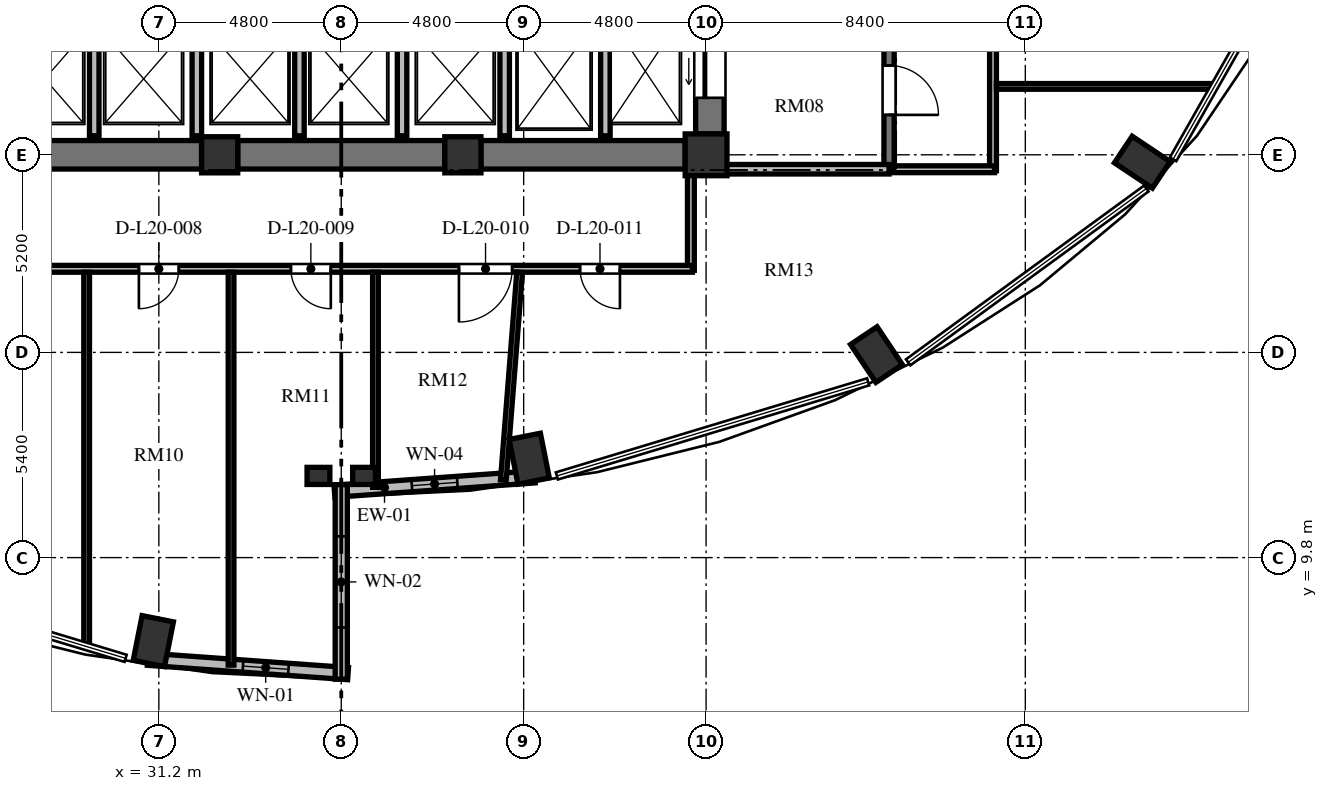
"""IFC4 building model, lengths in metres.
Left out: names, types, materials, properties, quantities, classifications, styles, units other than length and angle.
Written with IfcOpenShell. Run it as: python <this file> out.ifc"""

import sys

from ifc_helpers import new_model, si_unit, direction, frame, frame_2d, origin, origin_2d, place, context, subcontext, project, spatial, rectangle, extrude, element, fill, save


model = new_model("IFC4")
c1 = context("Model", 3, precision=1e-05, world=origin(), true_north=direction((0.0, 1.0)))
c2 = subcontext(c1, "Body", "Model", "MODEL_VIEW")
j1 = project(units=[si_unit("LENGTHUNIT", "METRE"), si_unit("PLANEANGLEUNIT", "RADIAN")], contexts=[c1])
p1 = place(None, origin())
s1 = spatial("IfcSite", under=j1, at=p1, CompositionType="ELEMENT")
p2 = place(p1, origin())
s2 = spatial("IfcBuilding", under=s1, at=p2, CompositionType="ELEMENT")
p3 = place(p2, frame((0.0, 0.0, 81.744)))
s3 = spatial("IfcBuildingStorey", under=s2, at=p3, CompositionType="ELEMENT", Elevation=81.744)
for number, where, z_axis, x_axis in (
    (1, (40.946, 12.403, 0.0), (0.0, 0.0, 1.0), (0.195, -0.981, 0.0)),
    (2, (50.084, 15.143, 0.0), (0.0, 0.0, 1.0), (0.556, -0.831, 0.0)),
    (3, (57.078, 20.205, 0.0), (0.0, 0.0, 1.0), (0.831, -0.556, 0.0)),
    (4, (31.054, 7.603, 0.0), (0.0, 0.0, 1.0), (-0.195, -0.981, 0.0)),
):
    element("IfcColumn", number, at=place(p3, frame(where, z_axis=z_axis, x_axis=x_axis)), inside=s3, PredefinedType="COLUMN", context=c2, shape_type="SweptSolid", body=[
        extrude(rectangle(XDim=1.2, YDim=0.84, at=origin_2d()), origin(), (0.0, 0.0, 1.0), 3.648),
    ])
for number, where, z_axis, x_axis in (
    (5, (32.8, 20.4, 0.0), (0.0, 0.0, 1.0), (1.0, 0.0, 0.0)),
    (6, (39.2, 20.4, 0.0), (0.0, 0.0, 1.0), (1.0, 0.0, 0.0)),
):
    element("IfcColumn", number, at=place(p3, frame(where, z_axis=z_axis, x_axis=x_axis)), inside=s3, PredefinedType="COLUMN", context=c2, shape_type="SweptSolid", body=[
        extrude(rectangle(XDim=0.95, YDim=0.95, at=origin_2d()), origin(), (0.0, 0.0, 1.0), 3.648),
    ])
p4 = place(p3, frame((45.6, 20.4, 0.0), z_axis=(0.0, 0.0, 1.0), x_axis=(1.0, 0.0, 0.0)))
e7 = element("IfcColumn", 7, at=p4, inside=s3, PredefinedType="COLUMN", context=c2, shape_type="SweptSolid", body=[
    extrude(rectangle(XDim=1.1, YDim=1.1, at=origin_2d()), origin(), (0.0, 0.0, 1.0), 3.648),
])
for number, where, z_axis, x_axis in (
    (8, (35.4, 11.95, 0.0), (0.0, 0.0, 1.0), (1.0, 0.0, 0.0)),
    (9, (36.6, 11.95, 0.0), (0.0, 0.0, 1.0), (1.0, 0.0, 0.0)),
):
    element("IfcColumn", number, at=place(p3, frame(where, z_axis=z_axis, x_axis=x_axis)), inside=s3, PredefinedType="PILASTER", context=c2, shape_type="SweptSolid", body=[
        extrude(rectangle(XDim=0.6, YDim=0.45, at=origin_2d()), origin(), (0.0, 0.0, 1.0), 3.648),
    ])
p5 = place(p3, frame((45.7, 20.95, 0.0), z_axis=(0.0, 0.0, 1.0), x_axis=(0.0, 1.0, 0.0)))
e10 = element("IfcWall", 10, at=p5, inside=s3, PredefinedType="SHEAR", context=c2, shape_type="SweptSolid", body=[
    extrude(rectangle(XDim=14.1, YDim=0.75, at=frame_2d((7.05, 0.0))), origin(), (0.0, 0.0, 1.0), 3.648),
])
p6 = place(p5, frame((11.75, 0.0, 0.0)))
e11 = element("IfcOpeningElement", 11, at=p6, cuts=e10, PredefinedType="OPENING", context=c2, shape_type="SweptSolid", body=[
    extrude(rectangle(XDim=1.4, YDim=2.3, at=frame_2d((0.7, 1.15))), frame((0.0, 0.385, 0.0), z_axis=(0.0, -1.0, 0.0), x_axis=(1.0, 0.0, 0.0)), (0.0, 0.0, 1.0), 0.77),
])
p7 = place(p5, frame((0.95, 0.0, 0.0)))
e12 = element("IfcOpeningElement", 12, at=p7, cuts=e10, PredefinedType="OPENING", context=c2, shape_type="SweptSolid", body=[
    extrude(rectangle(XDim=1.4, YDim=2.3, at=frame_2d((0.7, 1.15))), frame((0.0, 0.385, 0.0), z_axis=(0.0, -1.0, 0.0), x_axis=(1.0, 0.0, 0.0)), (0.0, 0.0, 1.0), 0.77),
])
p8 = place(p3, frame((26.95, 20.4, 0.0), z_axis=(0.0, 0.0, 1.0), x_axis=(1.0, 0.0, 0.0)))
e13 = element("IfcWall", 13, at=p8, inside=s3, PredefinedType="SHEAR", context=c2, shape_type="SweptSolid", body=[
    extrude(rectangle(XDim=5.375, YDim=0.75, at=frame_2d((2.688, 0.0))), origin(), (0.0, 0.0, 1.0), 3.648),
])
p9 = place(p3, frame((33.275, 20.4, 0.0), z_axis=(0.0, 0.0, 1.0), x_axis=(1.0, 0.0, 0.0)))
e14 = element("IfcWall", 14, at=p9, inside=s3, PredefinedType="SHEAR", context=c2, shape_type="SweptSolid", body=[
    extrude(rectangle(XDim=5.45, YDim=0.75, at=frame_2d((2.725, 0.0))), origin(), (0.0, 0.0, 1.0), 3.648),
])
p10 = place(p3, frame((39.675, 20.4, 0.0), z_axis=(0.0, 0.0, 1.0), x_axis=(1.0, 0.0, 0.0)))
e15 = element("IfcWall", 15, at=p10, inside=s3, PredefinedType="SHEAR", context=c2, shape_type="SweptSolid", body=[
    extrude(rectangle(XDim=5.375, YDim=0.75, at=frame_2d((2.688, 0.0))), origin(), (0.0, 0.0, 1.0), 3.648),
])
p11 = place(p3, frame((35.821, 11.547, 0.0), z_axis=(0.0, 0.0, 1.0), x_axis=(0.997432364291, 0.071614793619, 0.0)))
e16 = element("IfcWall", 16, at=p11, inside=s3, PredefinedType="SOLIDWALL", context=c2, shape_type="SweptSolid", body=[
    extrude(rectangle(XDim=5.284, YDim=0.32, at=frame_2d((2.642, 0.0))), origin(), (0.0, 0.0, 1.0), 3.428),
])
p12 = place(p11, frame((2.042, 0.0, 0.85)))
e17 = element("IfcOpeningElement", 17, at=p12, cuts=e16, PredefinedType="OPENING", context=c2, shape_type="SweptSolid", body=[
    extrude(rectangle(XDim=1.2, YDim=1.8, at=frame_2d((0.6, 0.9))), frame((0.0, 0.17, 0.0), z_axis=(0.0, -1.0, 0.0), x_axis=(1.0, 0.0, 0.0)), (0.0, 0.0, 1.0), 0.34),
])
p13 = place(p3, frame((30.909, 7.125, 0.0), z_axis=(0.0, 0.0, 1.0), x_axis=(0.997431890304, -0.071621394884, 0.0)))
e18 = element("IfcWall", 18, at=p13, inside=s3, PredefinedType="SOLIDWALL", context=c2, shape_type="SweptSolid", body=[
    extrude(rectangle(XDim=5.284, YDim=0.32, at=frame_2d((2.642, 0.0))), origin(), (0.0, 0.0, 1.0), 3.428),
])
p14 = place(p13, frame((2.511, 0.0, 0.85)))
e19 = element("IfcOpeningElement", 19, at=p14, cuts=e18, PredefinedType="OPENING", context=c2, shape_type="SweptSolid", body=[
    extrude(rectangle(XDim=1.2, YDim=2.2, at=frame_2d((0.6, 1.1))), frame((0.0, 0.17, 0.0), z_axis=(0.0, -1.0, 0.0), x_axis=(1.0, 0.0, 0.0)), (0.0, 0.0, 1.0), 0.34),
])
p15 = place(p3, frame((36.0, 6.6, 0.0), z_axis=(0.0, 0.0, 1.0), x_axis=(0.0, 1.0, 0.0)))
e20 = element("IfcWall", 20, at=p15, inside=s3, PredefinedType="SOLIDWALL", context=c2, shape_type="SweptSolid", body=[
    extrude(rectangle(XDim=5.12, YDim=0.32, at=frame_2d((2.56, 0.0))), origin(), (0.0, 0.0, 1.0), 3.428),
])
p16 = place(p15, frame((1.36, 0.0, 0.84)))
e21 = element("IfcOpeningElement", 21, at=p16, cuts=e20, PredefinedType="OPENING", context=c2, shape_type="SweptSolid", body=[
    extrude(rectangle(XDim=2.4, YDim=2.04, at=frame_2d((1.2, 1.02))), frame((0.0, 0.17, 0.0), z_axis=(0.0, -1.0, 0.0), x_axis=(1.0, 0.0, 0.0)), (0.0, 0.0, 1.0), 0.34),
])
p17 = place(p3, frame((42.95, 20.9, 0.0), z_axis=(0.0, 0.0, 1.0), x_axis=(0.0, 1.0, 0.0)))
e22 = element("IfcWall", 22, at=p17, inside=s3, PredefinedType="SOLIDWALL", context=c2, shape_type="SweptSolid", body=[
    extrude(rectangle(XDim=3.2, YDim=0.25, at=frame_2d((1.6, 0.0))), origin(), (0.0, 0.0, 1.0), 3.428),
])
for number, where, z_axis, x_axis in (
    (23, (29.5, 20.9, 0.0), (0.0, 0.0, 1.0), (0.0, 1.0, 0.0)),
    (24, (32.2, 20.9, 0.0), (0.0, 0.0, 1.0), (0.0, 1.0, 0.0)),
    (25, (34.9, 20.9, 0.0), (0.0, 0.0, 1.0), (0.0, 1.0, 0.0)),
    (26, (37.6, 20.9, 0.0), (0.0, 0.0, 1.0), (0.0, 1.0, 0.0)),
    (27, (40.3, 20.9, 0.0), (0.0, 0.0, 1.0), (0.0, 1.0, 0.0)),
):
    element("IfcWall", number, at=place(p3, frame(where, z_axis=z_axis, x_axis=x_axis)), inside=s3, PredefinedType="SOLIDWALL", context=c2, shape_type="SweptSolid", body=[
        extrude(rectangle(XDim=2.8, YDim=0.25, at=frame_2d((1.4, 0.0))), origin(), (0.0, 0.0, 1.0), 3.428),
    ])
p18 = place(p3, frame((50.415, 35.845, 0.0), z_axis=(0.0, 0.0, 1.0), x_axis=(0.0, -1.0, 0.0)))
e28 = element("IfcWall", 28, at=p18, inside=s3, PredefinedType="SHEAR", context=c2, shape_type="SweptSolid", body=[
    extrude(rectangle(XDim=15.825, YDim=0.27, at=frame_2d((7.913, 0.0))), origin(), (0.0, 0.0, 1.0), 3.648),
])
p19 = place(p18, frame((4.445, 0.0, 0.0)))
e29 = element("IfcOpeningElement", 29, at=p19, cuts=e28, PredefinedType="OPENING", context=c2, shape_type="SweptSolid", body=[
    extrude(rectangle(XDim=1.2, YDim=2.15, at=frame_2d((0.6, 1.075))), frame((0.0, 0.145, 0.0), z_axis=(0.0, -1.0, 0.0), x_axis=(1.0, 0.0, 0.0)), (0.0, 0.0, 1.0), 0.29),
])
p20 = place(p18, frame((1.295, 0.0, 0.0)))
e30 = element("IfcOpeningElement", 30, at=p20, cuts=e28, PredefinedType="OPENING", context=c2, shape_type="SweptSolid", body=[
    extrude(rectangle(XDim=1.3, YDim=2.2, at=frame_2d((0.65, 1.1))), frame((0.0, 0.145, 0.0), z_axis=(0.0, -1.0, 0.0), x_axis=(1.0, 0.0, 0.0)), (0.0, 0.0, 1.0), 0.29),
])
p21 = place(p18, frame((13.095, 0.0, 0.0)))
e31 = element("IfcOpeningElement", 31, at=p21, cuts=e28, PredefinedType="OPENING", context=c2, shape_type="SweptSolid", body=[
    extrude(rectangle(XDim=1.3, YDim=2.2, at=frame_2d((0.65, 1.1))), frame((0.0, 0.145, 0.0), z_axis=(0.0, -1.0, 0.0), x_axis=(1.0, 0.0, 0.0)), (0.0, 0.0, 1.0), 0.29),
])
p22 = place(p3, frame((45.7, 20.02, 0.0), z_axis=(0.0, 0.0, 1.0), x_axis=(1.0, 0.0, 0.0)))
e32 = element("IfcWall", 32, at=p22, inside=s3, PredefinedType="SOLIDWALL", context=c2, shape_type="SweptSolid", body=[
    extrude(rectangle(XDim=4.715, YDim=0.25, at=frame_2d((2.357, 0.0))), origin(), (0.0, 0.0, 1.0), 3.428),
])
p23 = place(p3, frame((53.15, 26.64, 0.0), z_axis=(0.0, 0.0, 1.0), x_axis=(0.0, -1.0, 0.0)))
e33 = element("IfcWall", 33, at=p23, inside=s3, PredefinedType="PARTITIONING", context=c2, shape_type="SweptSolid", body=[
    extrude(rectangle(XDim=6.66, YDim=0.18, at=frame_2d((3.33, 0.0))), origin(), (0.0, 0.0, 1.0), 3.428),
])
p24 = place(p3, frame((53.19, 20.02, 0.0), z_axis=(0.0, 0.0, 1.0), x_axis=(-1.0, 0.0, 0.0)))
e34 = element("IfcWall", 34, at=p24, inside=s3, PredefinedType="PARTITIONING", context=c2, shape_type="SweptSolid", body=[
    extrude(rectangle(XDim=2.65, YDim=0.18, at=frame_2d((1.325, 0.0))), origin(), (0.0, 0.0, 1.0), 3.428),
])
p25 = place(p3, frame((45.2, 19.91, 0.0), z_axis=(0.0, 0.0, 1.0), x_axis=(0.0, -1.0, 0.0)))
e35 = element("IfcWall", 35, at=p25, inside=s3, PredefinedType="PARTITIONING", context=c2, shape_type="SweptSolid", body=[
    extrude(rectangle(XDim=2.55, YDim=0.18, at=frame_2d((1.275, 0.0))), origin(), (0.0, 0.0, 1.0), 3.428),
])
p26 = place(p3, frame((45.24, 17.4, 0.0), z_axis=(0.0, 0.0, 1.0), x_axis=(-1.0, 0.0, 0.0)))
e36 = element("IfcWall", 36, at=p26, inside=s3, PredefinedType="PARTITIONING", context=c2, shape_type="SweptSolid", body=[
    extrude(rectangle(XDim=21.93, YDim=0.18, at=frame_2d((10.965, 0.0))), origin(), (0.0, 0.0, 1.0), 3.053),
])
p27 = place(p26, frame((18.251, 0.0, 0.0)))
e37 = element("IfcOpeningElement", 37, at=p27, cuts=e36, PredefinedType="OPENING", context=c2, shape_type="SweptSolid", body=[
    extrude(rectangle(XDim=1.05, YDim=2.15, at=frame_2d((0.525, 1.075))), frame((0.0, 0.1, 0.0), z_axis=(0.0, -1.0, 0.0), x_axis=(1.0, 0.0, 0.0)), (0.0, 0.0, 1.0), 0.2),
])
p28 = place(p26, frame((13.515, 0.0, 0.0)))
e38 = element("IfcOpeningElement", 38, at=p28, cuts=e36, PredefinedType="OPENING", context=c2, shape_type="SweptSolid", body=[
    extrude(rectangle(XDim=1.05, YDim=2.15, at=frame_2d((0.525, 1.075))), frame((0.0, 0.1, 0.0), z_axis=(0.0, -1.0, 0.0), x_axis=(1.0, 0.0, 0.0)), (0.0, 0.0, 1.0), 0.2),
])
p29 = place(p26, frame((9.515, 0.0, 0.0)))
e39 = element("IfcOpeningElement", 39, at=p29, cuts=e36, PredefinedType="OPENING", context=c2, shape_type="SweptSolid", body=[
    extrude(rectangle(XDim=1.05, YDim=2.15, at=frame_2d((0.525, 1.075))), frame((0.0, 0.1, 0.0), z_axis=(0.0, -1.0, 0.0), x_axis=(1.0, 0.0, 0.0)), (0.0, 0.0, 1.0), 0.2),
])
p30 = place(p26, frame((4.743, 0.0, 0.0)))
e40 = element("IfcOpeningElement", 40, at=p30, cuts=e36, PredefinedType="OPENING", context=c2, shape_type="SweptSolid", body=[
    extrude(rectangle(XDim=1.4, YDim=2.2, at=frame_2d((0.7, 1.1))), frame((0.0, 0.1, 0.0), z_axis=(0.0, -1.0, 0.0), x_axis=(1.0, 0.0, 0.0)), (0.0, 0.0, 1.0), 0.2),
])
p31 = place(p26, frame((1.907, 0.0, 0.0)))
e41 = element("IfcOpeningElement", 41, at=p31, cuts=e36, PredefinedType="OPENING", context=c2, shape_type="SweptSolid", body=[
    extrude(rectangle(XDim=1.05, YDim=2.15, at=frame_2d((0.525, 1.075))), frame((0.0, 0.1, 0.0), z_axis=(0.0, -1.0, 0.0), x_axis=(1.0, 0.0, 0.0)), (0.0, 0.0, 1.0), 0.2),
])
p32 = place(p3, frame((53.24, 22.2, 0.0), z_axis=(0.0, 0.0, 1.0), x_axis=(1.0, 0.0, 0.0)))
e42 = element("IfcWall", 42, at=p32, inside=s3, PredefinedType="PARTITIONING", context=c2, shape_type="SweptSolid", body=[
    extrude(rectangle(XDim=5.731, YDim=0.15, at=frame_2d((2.866, 0.0))), origin(), (0.0, 0.0, 1.0), 3.428),
])
p33 = place(p3, frame((29.3, 7.473, 0.0), z_axis=(0.0, 0.0, 1.0), x_axis=(0.0, 1.0, 0.0)))
e43 = element("IfcWall", 43, at=p33, inside=s3, PredefinedType="PARTITIONING", context=c2, shape_type="SweptSolid", body=[
    extrude(rectangle(XDim=9.837, YDim=0.15, at=frame_2d((4.918, 0.0))), origin(), (0.0, 0.0, 1.0), 3.428),
])
p34 = place(p3, frame((33.1, 6.971, 0.0), z_axis=(0.0, 0.0, 1.0), x_axis=(0.0, 1.0, 0.0)))
e44 = element("IfcWall", 44, at=p34, inside=s3, PredefinedType="PARTITIONING", context=c2, shape_type="SweptSolid", body=[
    extrude(rectangle(XDim=10.339, YDim=0.15, at=frame_2d((5.17, 0.0))), origin(), (0.0, 0.0, 1.0), 3.428),
])
p35 = place(p3, frame((36.9, 11.649, 0.0), z_axis=(0.0, 0.0, 1.0), x_axis=(0.0, 1.0, 0.0)))
e45 = element("IfcWall", 45, at=p35, inside=s3, PredefinedType="PARTITIONING", context=c2, shape_type="SweptSolid", body=[
    extrude(rectangle(XDim=5.661, YDim=0.15, at=frame_2d((2.83, 0.0))), origin(), (0.0, 0.0, 1.0), 3.428),
])
p36 = place(p3, frame((40.265, 11.838, 0.0), z_axis=(0.0, 0.0, 1.0), x_axis=(0.078196446306, 0.996937969878, 0.0)))
e46 = element("IfcWall", 46, at=p36, inside=s3, PredefinedType="PARTITIONING", context=c2, shape_type="SweptSolid", body=[
    extrude(rectangle(XDim=5.489, YDim=0.15, at=frame_2d((2.744, 0.0))), origin(), (0.0, 0.0, 1.0), 3.428),
])
p37 = place(p12, origin())
e47 = element("IfcWindow", 47, at=p37, inside=s3, PartitioningType="SINGLE_PANEL", PredefinedType="WINDOW", context=c2, shape_type="SweptSolid", body=[
    extrude(rectangle(XDim=1.2, YDim=1.8, at=frame_2d((0.6, 0.9))), frame((0.0, 0.03, 0.0), z_axis=(0.0, -1.0, 0.0), x_axis=(1.0, 0.0, 0.0)), (0.0, 0.0, 1.0), 0.06),
])
fill(e17, e47)
p38 = place(p14, origin())
e48 = element("IfcWindow", 48, at=p38, inside=s3, PartitioningType="SINGLE_PANEL", PredefinedType="WINDOW", context=c2, shape_type="SweptSolid", body=[
    extrude(rectangle(XDim=1.2, YDim=2.2, at=frame_2d((0.6, 1.1))), frame((0.0, 0.03, 0.0), z_axis=(0.0, -1.0, 0.0), x_axis=(1.0, 0.0, 0.0)), (0.0, 0.0, 1.0), 0.06),
])
fill(e19, e48)
p39 = place(p16, origin())
e49 = element("IfcWindow", 49, at=p39, inside=s3, PartitioningType="SINGLE_PANEL", PredefinedType="WINDOW", context=c2, shape_type="SweptSolid", body=[
    extrude(rectangle(XDim=2.4, YDim=2.04, at=frame_2d((1.2, 1.02))), frame((0.0, 0.03, 0.0), z_axis=(0.0, -1.0, 0.0), x_axis=(1.0, 0.0, 0.0)), (0.0, 0.0, 1.0), 0.06),
])
fill(e21, e49)
p40 = place(p7, origin())
e50 = element("IfcDoor", 50, at=p40, inside=s3, OperationType="SLIDING_TO_LEFT", PredefinedType="DOOR", context=c2, shape_type="SweptSolid", body=[
    extrude(rectangle(XDim=1.4, YDim=2.3, at=frame_2d((0.7, 1.15))), frame((0.0, 0.025, 0.0), z_axis=(0.0, -1.0, 0.0), x_axis=(1.0, 0.0, 0.0)), (0.0, 0.0, 1.0), 0.05),
])
fill(e12, e50)
p41 = place(p21, origin())
e51 = element("IfcDoor", 51, at=p41, inside=s3, OperationType="SINGLE_SWING_RIGHT", PredefinedType="DOOR", context=c2, shape_type="SweptSolid", body=[
    extrude(rectangle(XDim=1.3, YDim=2.2, at=frame_2d((0.65, 1.1))), frame((0.0, 0.025, 0.0), z_axis=(0.0, -1.0, 0.0), x_axis=(1.0, 0.0, 0.0)), (0.0, 0.0, 1.0), 0.05),
])
fill(e31, e51)
p42 = place(p28, origin())
e52 = element("IfcDoor", 52, at=p42, inside=s3, OperationType="SINGLE_SWING_RIGHT", PredefinedType="DOOR", context=c2, shape_type="SweptSolid", body=[
    extrude(rectangle(XDim=1.05, YDim=2.15, at=frame_2d((0.525, 1.075))), frame((0.0, 0.025, 0.0), z_axis=(0.0, -1.0, 0.0), x_axis=(1.0, 0.0, 0.0)), (0.0, 0.0, 1.0), 0.05),
])
fill(e38, e52)
p43 = place(p29, origin())
e53 = element("IfcDoor", 53, at=p43, inside=s3, OperationType="SINGLE_SWING_LEFT", PredefinedType="DOOR", context=c2, shape_type="SweptSolid", body=[
    extrude(rectangle(XDim=1.05, YDim=2.15, at=frame_2d((0.525, 1.075))), frame((0.0, 0.025, 0.0), z_axis=(0.0, -1.0, 0.0), x_axis=(1.0, 0.0, 0.0)), (0.0, 0.0, 1.0), 0.05),
])
fill(e39, e53)
p44 = place(p30, origin())
e54 = element("IfcDoor", 54, at=p44, inside=s3, OperationType="SINGLE_SWING_RIGHT", PredefinedType="DOOR", context=c2, shape_type="SweptSolid", body=[
    extrude(rectangle(XDim=1.4, YDim=2.2, at=frame_2d((0.7, 1.1))), frame((0.0, 0.025, 0.0), z_axis=(0.0, -1.0, 0.0), x_axis=(1.0, 0.0, 0.0)), (0.0, 0.0, 1.0), 0.05),
])
fill(e40, e54)
p45 = place(p31, origin())
e55 = element("IfcDoor", 55, at=p45, inside=s3, OperationType="SINGLE_SWING_LEFT", PredefinedType="DOOR", context=c2, shape_type="SweptSolid", body=[
    extrude(rectangle(XDim=1.05, YDim=2.15, at=frame_2d((0.525, 1.075))), frame((0.0, 0.025, 0.0), z_axis=(0.0, -1.0, 0.0), x_axis=(1.0, 0.0, 0.0)), (0.0, 0.0, 1.0), 0.05),
])
fill(e41, e55)
save(model, sys.argv[1])
